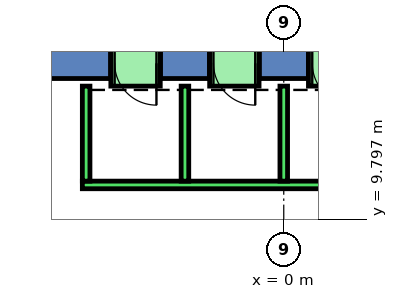
"""IFC4 building model, lengths in metres.
Left out: names, types, materials, properties, quantities, classifications, styles, units other than length and angle.
Written with IfcOpenShell. Run it as: python <this file> out.ifc"""

import sys

from ifc_helpers import new_model, si_unit, direction, frame, frame_2d, origin, place, context, subcontext, project, spatial, polyline, rectangle, outline, extrude, element, fill, save


model = new_model("IFC4")
c1 = context("Model", 3, precision=1e-05, world=origin(), true_north=direction((0.0, 1.0)))
c2 = subcontext(c1, "Body", "Model", "MODEL_VIEW")
j1 = project(units=[si_unit("LENGTHUNIT", "METRE"), si_unit("PLANEANGLEUNIT", "RADIAN")], contexts=[c1])
p1 = place(None, origin())
s1 = spatial("IfcSite", under=j1, at=p1, CompositionType="ELEMENT")
p2 = place(p1, origin())
s2 = spatial("IfcBuilding", under=s1, at=p2, CompositionType="ELEMENT")
p3 = place(p2, frame((0.0, 0.0, 9.0)))
s3 = spatial("IfcBuildingStorey", under=s2, at=p3, CompositionType="ELEMENT", Elevation=9.0)
p4 = place(p3, frame((0.0, 0.0, -0.45)))
e1 = element("IfcWall", 1, at=p4, inside=s3, PredefinedType="SHEAR", context=c2, shape_type="SweptSolid", body=[
    extrude(outline(polyline([(-0.65, 14.5), (-0.65, 13.5), (0.65, 13.5), (0.65, 14.5), (-0.65, 14.5)])), origin(), (0.0, 0.0, 1.0), 6.0),
])
p5 = place(p3, frame((0.0, 0.0, -0.45)))
e2 = element("IfcWall", 2, at=p5, inside=s3, PredefinedType="SHEAR", context=c2, shape_type="SweptSolid", body=[
    extrude(outline(polyline([(-3.25, 14.5), (-3.25, 13.5), (-1.95, 13.5), (-1.95, 14.5), (-3.25, 14.5)])), origin(), (0.0, 0.0, 1.0), 6.0),
])
p6 = place(p3, frame((0.0, 0.0, -0.45)))
e3 = element("IfcWall", 3, at=p6, inside=s3, PredefinedType="SHEAR", context=c2, shape_type="SweptSolid", body=[
    extrude(outline(polyline([(-4.55, 13.5), (-4.55, 14.5), (-6.928, 14.5), (-6.351, 13.5), (-4.55, 13.5)])), origin(), (0.0, 0.0, 1.0), 6.0),
])
p7 = place(p3, frame((0.0, 0.0, 3.6)))
e4 = element("IfcWall", 4, at=p7, inside=s3, PredefinedType="SHEAR", context=c2, shape_type="SweptSolid", body=[
    extrude(outline(polyline([(0.65, 14.5), (0.65, 13.5), (1.95, 13.5), (1.95, 14.5), (0.65, 14.5)])), origin(), (0.0, 0.0, 1.0), 1.95),
])
p8 = place(p3, frame((0.0, 0.0, 3.6)))
e5 = element("IfcWall", 5, at=p8, inside=s3, PredefinedType="SHEAR", context=c2, shape_type="SweptSolid", body=[
    extrude(outline(polyline([(-1.95, 14.5), (-1.95, 13.5), (-0.65, 13.5), (-0.65, 14.5), (-1.95, 14.5)])), origin(), (0.0, 0.0, 1.0), 1.95),
])
p9 = place(p3, frame((0.0, 0.0, 3.6)))
e6 = element("IfcWall", 6, at=p9, inside=s3, PredefinedType="SHEAR", context=c2, shape_type="SweptSolid", body=[
    extrude(outline(polyline([(-4.55, 14.5), (-4.55, 13.5), (-3.25, 13.5), (-3.25, 14.5), (-4.55, 14.5)])), origin(), (0.0, 0.0, 1.0), 1.95),
])
p10 = place(p3, frame((5.3, 10.7, 0.0), z_axis=(0.0, 0.0, 1.0), x_axis=(-1.0, 0.0, 0.0)))
e7 = element("IfcWall", 7, at=p10, inside=s3, PredefinedType="STANDARD", context=c2, shape_type="SweptSolid", body=[
    extrude(rectangle(XDim=10.6, YDim=0.2, at=frame_2d((5.3, 0.0))), origin(), (0.0, 0.0, 1.0), 5.55),
])
for number, where, z_axis, x_axis in (
    (8, (0.0, 10.8, 0.0), (0.0, 0.0, 1.0), (0.0, 1.0, 0.0)),
    (9, (-2.6, 10.8, 0.0), (0.0, 0.0, 1.0), (0.0, 1.0, 0.0)),
    (10, (-5.2, 10.8, 0.0), (0.0, 0.0, 1.0), (0.0, 1.0, 0.0)),
):
    element("IfcWall", number, at=place(p3, frame(where, z_axis=z_axis, x_axis=x_axis)), inside=s3, PredefinedType="STANDARD", context=c2, shape_type="SweptSolid", body=[
        extrude(rectangle(XDim=2.5, YDim=0.2, at=frame_2d((1.25, 0.0))), origin(), (0.0, 0.0, 1.0), 5.55),
    ])
p11 = place(p3, frame((1.95, 13.9, 0.0), z_axis=(0.0, 0.0, 1.0), x_axis=(-1.0, 0.0, 0.0)))
e11 = element("IfcWall", 11, at=p11, inside=s3, PredefinedType="STANDARD", context=c2, shape_type="SweptSolid", body=[
    extrude(rectangle(XDim=1.3, YDim=1.2, at=frame_2d((0.65, 0.0))), origin(), (0.0, 0.0, 1.0), 2.4),
])
p12 = place(p11, frame((0.1, 0.0, 0.0)))
e12 = element("IfcOpeningElement", 12, at=p12, cuts=e11, PredefinedType="OPENING", context=c2, shape_type="SweptSolid", body=[
    extrude(rectangle(XDim=1.1, YDim=2.3, at=frame_2d((0.55, 1.15))), frame((0.0, 0.61, 0.0), z_axis=(0.0, -1.0, 0.0), x_axis=(1.0, 0.0, 0.0)), (0.0, 0.0, 1.0), 1.22),
])
p13 = place(p3, frame((-0.65, 13.9, 0.0), z_axis=(0.0, 0.0, 1.0), x_axis=(-1.0, 0.0, 0.0)))
e13 = element("IfcWall", 13, at=p13, inside=s3, PredefinedType="STANDARD", context=c2, shape_type="SweptSolid", body=[
    extrude(rectangle(XDim=1.3, YDim=1.2, at=frame_2d((0.65, 0.0))), origin(), (0.0, 0.0, 1.0), 2.4),
])
p14 = place(p13, frame((0.1, 0.0, 0.0)))
e14 = element("IfcOpeningElement", 14, at=p14, cuts=e13, PredefinedType="OPENING", context=c2, shape_type="SweptSolid", body=[
    extrude(rectangle(XDim=1.1, YDim=2.3, at=frame_2d((0.55, 1.15))), frame((0.0, 0.61, 0.0), z_axis=(0.0, -1.0, 0.0), x_axis=(1.0, 0.0, 0.0)), (0.0, 0.0, 1.0), 1.22),
])
p15 = place(p3, frame((-3.25, 13.9, 0.0), z_axis=(0.0, 0.0, 1.0), x_axis=(-1.0, 0.0, 0.0)))
e15 = element("IfcWall", 15, at=p15, inside=s3, PredefinedType="STANDARD", context=c2, shape_type="SweptSolid", body=[
    extrude(rectangle(XDim=1.3, YDim=1.2, at=frame_2d((0.65, 0.0))), origin(), (0.0, 0.0, 1.0), 2.4),
])
p16 = place(p15, frame((0.1, 0.0, 0.0)))
e16 = element("IfcOpeningElement", 16, at=p16, cuts=e15, PredefinedType="OPENING", context=c2, shape_type="SweptSolid", body=[
    extrude(rectangle(XDim=1.1, YDim=2.3, at=frame_2d((0.55, 1.15))), frame((0.0, 0.61, 0.0), z_axis=(0.0, -1.0, 0.0), x_axis=(1.0, 0.0, 0.0)), (0.0, 0.0, 1.0), 1.22),
])
p17 = place(p12, origin())
e17 = element("IfcDoor", 17, at=p17, inside=s3, OperationType="SLIDING_TO_LEFT", PredefinedType="DOOR", context=c2, shape_type="SweptSolid", body=[
    extrude(rectangle(XDim=1.1, YDim=2.3, at=frame_2d((0.55, 1.15))), frame((0.0, 0.025, 0.0), z_axis=(0.0, -1.0, 0.0), x_axis=(1.0, 0.0, 0.0)), (0.0, 0.0, 1.0), 0.05),
])
fill(e12, e17)
p18 = place(p14, origin())
e18 = element("IfcDoor", 18, at=p18, inside=s3, OperationType="SLIDING_TO_LEFT", PredefinedType="DOOR", context=c2, shape_type="SweptSolid", body=[
    extrude(rectangle(XDim=1.1, YDim=2.3, at=frame_2d((0.55, 1.15))), frame((0.0, 0.025, 0.0), z_axis=(0.0, -1.0, 0.0), x_axis=(1.0, 0.0, 0.0)), (0.0, 0.0, 1.0), 0.05),
])
fill(e14, e18)
p19 = place(p16, origin())
e19 = element("IfcDoor", 19, at=p19, inside=s3, OperationType="SLIDING_TO_LEFT", PredefinedType="DOOR", context=c2, shape_type="SweptSolid", body=[
    extrude(rectangle(XDim=1.1, YDim=2.3, at=frame_2d((0.55, 1.15))), frame((0.0, 0.025, 0.0), z_axis=(0.0, -1.0, 0.0), x_axis=(1.0, 0.0, 0.0)), (0.0, 0.0, 1.0), 0.05),
])
fill(e16, e19)
save(model, sys.argv[1])
